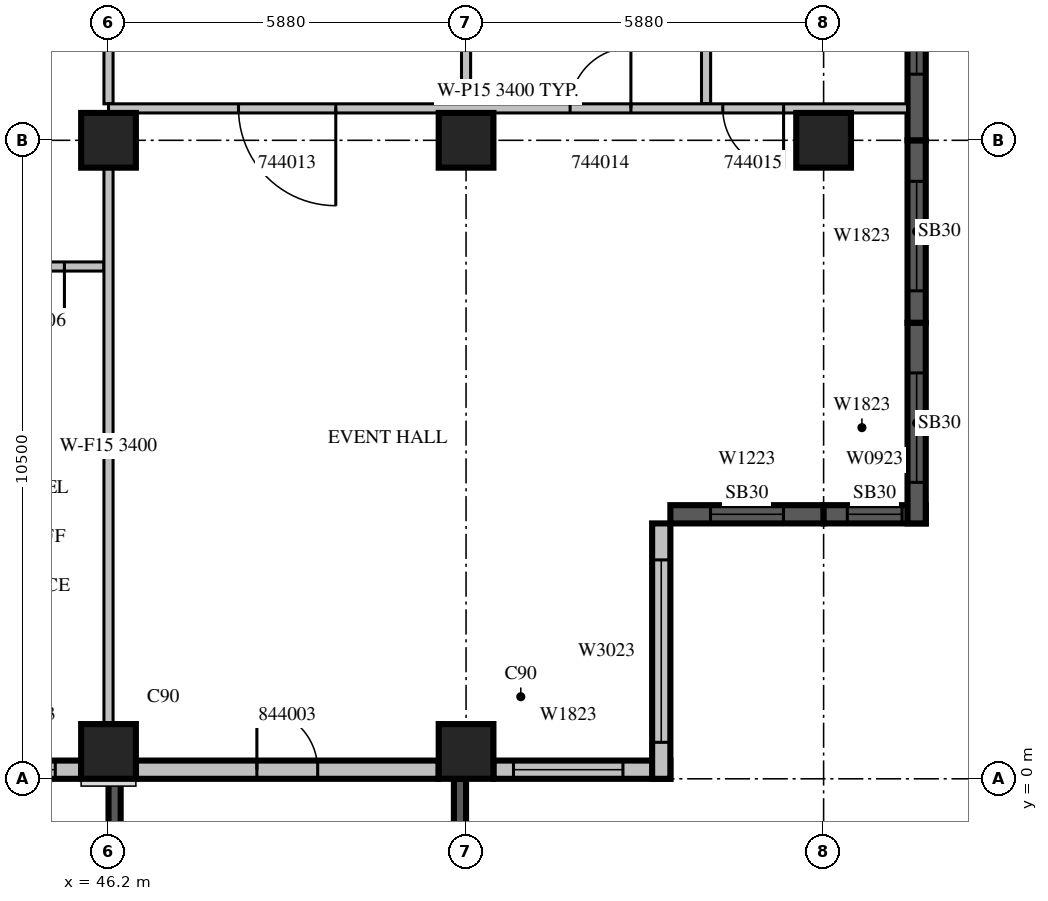
"""IFC4 building model, lengths in metres.
Left out: names, types, materials, properties, quantities, classifications, styles, units other than length and angle.
Written with IfcOpenShell. Run it as: python <this file> out.ifc"""

import sys

from ifc_helpers import new_model, si_unit, direction, frame, frame_2d, origin, origin_2d, place, context, subcontext, project, spatial, rectangle, extrude, source, transform, mapped, element, fill, save


model = new_model("IFC4")
c1 = context("Model", 3, precision=1e-05, world=origin(), true_north=direction((0.0, 1.0)))
c2 = subcontext(c1, "Body", "Model", "MODEL_VIEW")
j1 = project(units=[si_unit("LENGTHUNIT", "METRE"), si_unit("PLANEANGLEUNIT", "RADIAN")], contexts=[c1])
p1 = place(None, origin())
s1 = spatial("IfcSite", under=j1, at=p1, CompositionType="ELEMENT")
p2 = place(p1, origin())
s2 = spatial("IfcBuilding", under=s1, at=p2, CompositionType="ELEMENT")
p3 = place(p2, frame((0.0, 0.0, 200.6)))
s3 = spatial("IfcBuildingStorey", under=s2, at=p3, CompositionType="ELEMENT", Elevation=200.6)
m1 = source(origin(), c2, "Body", "SweptSolid", [
    extrude(rectangle(XDim=0.9, YDim=0.9, at=origin_2d()), origin(), (0.0, 0.0, 1.0), 3.8),
])
for number, where, z_axis, x_axis in (
    (1, (46.2, 0.45, 0.0), (0.0, 0.0, 1.0), (1.0, 0.0, 0.0)),
    (2, (52.08, 0.45, 0.0), (0.0, 0.0, 1.0), (1.0, 0.0, 0.0)),
    (3, (46.2, 10.5, 0.0), (0.0, 0.0, 1.0), (1.0, 0.0, 0.0)),
    (4, (52.08, 10.5, 0.0), (0.0, 0.0, 1.0), (1.0, 0.0, 0.0)),
    (5, (57.96, 10.5, 0.0), (0.0, 0.0, 1.0), (1.0, 0.0, 0.0)),
):
    element("IfcColumn", number, at=place(p3, frame(where, z_axis=z_axis, x_axis=x_axis)), inside=s3, PredefinedType="COLUMN", context=c2, shape_type="MappedRepresentation", body=[
        mapped(m1, transform((0.0, 0.0, 0.0), scale=1.0)),
    ])
m2 = source(origin(), c2, "Body", "SweptSolid", [
    extrude(rectangle(XDim=1.75, YDim=0.3, at=frame_2d((0.875, 0.0))), origin(), (0.0, 0.0, 1.0), 3.4),
])
p4 = place(p3, frame((44.0, 0.15, 0.0), z_axis=(0.0, 0.0, 1.0), x_axis=(1.0, 0.0, 0.0)))
e6 = element("IfcWall", 6, at=p4, inside=s3, PredefinedType="STANDARD", context=c2, shape_type="MappedRepresentation", body=[
    mapped(m2, transform((0.0, 0.0, 0.0), scale=1.0)),
])
m3 = source(origin(), c2, "Body", "SweptSolid", [
    extrude(rectangle(XDim=0.9, YDim=2.3, at=frame_2d((0.45, 1.15))), frame((0.0, 0.16, 0.0), z_axis=(0.0, -1.0, 0.0), x_axis=(1.0, 0.0, 0.0)), (0.0, 0.0, 1.0), 0.32),
])
p5 = place(p4, frame((0.425, 0.0, 0.6)))
e7 = element("IfcOpeningElement", 7, at=p5, cuts=e6, PredefinedType="OPENING", context=c2, shape_type="MappedRepresentation", body=[
    mapped(m3, transform((0.0, 0.0, 0.0), scale=1.0)),
])
m4 = source(origin(), c2, "Body", "SweptSolid", [
    extrude(rectangle(XDim=4.98, YDim=0.3, at=frame_2d((2.49, 0.0))), origin(), (0.0, 0.0, 1.0), 3.4),
])
p6 = place(p3, frame((46.65, 0.15, 0.0), z_axis=(0.0, 0.0, 1.0), x_axis=(1.0, 0.0, 0.0)))
e8 = element("IfcWall", 8, at=p6, inside=s3, PredefinedType="STANDARD", context=c2, shape_type="MappedRepresentation", body=[
    mapped(m4, transform((0.0, 0.0, 0.0), scale=1.0)),
])
m5 = source(origin(), c2, "Body", "SweptSolid", [
    extrude(rectangle(XDim=1.0, YDim=2.1, at=frame_2d((0.5, 1.05))), frame((0.0, 0.16, 0.0), z_axis=(0.0, -1.0, 0.0), x_axis=(1.0, 0.0, 0.0)), (0.0, 0.0, 1.0), 0.32),
])
p7 = place(p6, frame((1.99, 0.0, 0.0)))
e9 = element("IfcOpeningElement", 9, at=p7, cuts=e8, PredefinedType="OPENING", context=c2, shape_type="MappedRepresentation", body=[
    mapped(m5, transform((0.0, 0.0, 0.0), scale=1.0)),
])
m6 = source(origin(), c2, "Body", "SweptSolid", [
    extrude(rectangle(XDim=2.91, YDim=0.3, at=frame_2d((1.455, 0.0))), origin(), (0.0, 0.0, 1.0), 3.4),
])
p8 = place(p3, frame((52.53, 0.15, 0.0), z_axis=(0.0, 0.0, 1.0), x_axis=(1.0, 0.0, 0.0)))
e10 = element("IfcWall", 10, at=p8, inside=s3, PredefinedType="STANDARD", context=c2, shape_type="MappedRepresentation", body=[
    mapped(m6, transform((0.0, 0.0, 0.0), scale=1.0)),
])
m7 = source(origin(), c2, "Body", "SweptSolid", [
    extrude(rectangle(XDim=1.8, YDim=2.3, at=frame_2d((0.9, 1.15))), frame((0.0, 0.16, 0.0), z_axis=(0.0, -1.0, 0.0), x_axis=(1.0, 0.0, 0.0)), (0.0, 0.0, 1.0), 0.32),
])
p9 = place(p8, frame((0.33, 0.0, 0.6)))
e11 = element("IfcOpeningElement", 11, at=p9, cuts=e10, PredefinedType="OPENING", context=c2, shape_type="MappedRepresentation", body=[
    mapped(m7, transform((0.0, 0.0, 0.0), scale=1.0)),
])
m8 = source(origin(), c2, "Body", "SweptSolid", [
    extrude(rectangle(XDim=4.2, YDim=0.3, at=frame_2d((2.1, 0.0))), origin(), (0.0, 0.0, 1.0), 3.4),
])
p10 = place(p3, frame((55.29, 0.0, 0.0), z_axis=(0.0, 0.0, 1.0), x_axis=(0.0, 1.0, 0.0)))
e12 = element("IfcWall", 12, at=p10, inside=s3, PredefinedType="STANDARD", context=c2, shape_type="MappedRepresentation", body=[
    mapped(m8, transform((0.0, 0.0, 0.0), scale=1.0)),
])
m9 = source(origin(), c2, "Body", "SweptSolid", [
    extrude(rectangle(XDim=3.0, YDim=2.3, at=frame_2d((1.5, 1.15))), frame((0.0, 0.16, 0.0), z_axis=(0.0, -1.0, 0.0), x_axis=(1.0, 0.0, 0.0)), (0.0, 0.0, 1.0), 0.32),
])
p11 = place(p10, frame((0.6, 0.0, 0.6)))
e13 = element("IfcOpeningElement", 13, at=p11, cuts=e12, PredefinedType="OPENING", context=c2, shape_type="MappedRepresentation", body=[
    mapped(m9, transform((0.0, 0.0, 0.0), scale=1.0)),
])
p12 = place(p3, frame((55.44, 4.35, 0.0), z_axis=(0.0, 0.0, 1.0), x_axis=(1.0, 0.0, 0.0)))
e14 = element("IfcWall", 14, at=p12, inside=s3, PredefinedType="SOLIDWALL", context=c2, shape_type="SweptSolid", body=[
    extrude(rectangle(XDim=2.52, YDim=0.3, at=frame_2d((1.26, 0.0))), origin(), (0.0, 0.0, 1.0), 3.4),
])
m10 = source(origin(), c2, "Body", "SweptSolid", [
    extrude(rectangle(XDim=1.2, YDim=2.3, at=frame_2d((0.6, 1.15))), frame((0.0, 0.16, 0.0), z_axis=(0.0, -1.0, 0.0), x_axis=(1.0, 0.0, 0.0)), (0.0, 0.0, 1.0), 0.32),
])
p13 = place(p12, frame((0.66, 0.0, 0.6)))
e15 = element("IfcOpeningElement", 15, at=p13, cuts=e14, PredefinedType="OPENING", context=c2, shape_type="MappedRepresentation", body=[
    mapped(m10, transform((0.0, 0.0, 0.0), scale=1.0)),
])
p14 = place(p3, frame((57.96, 4.35, 0.0), z_axis=(0.0, 0.0, 1.0), x_axis=(1.0, 0.0, 0.0)))
e16 = element("IfcWall", 16, at=p14, inside=s3, PredefinedType="SOLIDWALL", context=c2, shape_type="SweptSolid", body=[
    extrude(rectangle(XDim=1.68, YDim=0.3, at=frame_2d((0.84, 0.0))), origin(), (0.0, 0.0, 1.0), 3.4),
])
p15 = place(p14, frame((0.39, 0.0, 0.6)))
e17 = element("IfcOpeningElement", 17, at=p15, cuts=e16, PredefinedType="OPENING", context=c2, shape_type="MappedRepresentation", body=[
    mapped(m3, transform((0.0, 0.0, 0.0), scale=1.0)),
])
p16 = place(p3, frame((59.49, 4.2, 0.0), z_axis=(0.0, 0.0, 1.0), x_axis=(0.0, 1.0, 0.0)))
e18 = element("IfcWall", 18, at=p16, inside=s3, PredefinedType="SOLIDWALL", context=c2, shape_type="SweptSolid", body=[
    extrude(rectangle(XDim=3.3, YDim=0.3, at=frame_2d((1.65, 0.0))), origin(), (0.0, 0.0, 1.0), 3.4),
])
p17 = place(p16, frame((0.675, 0.0, 0.6)))
e19 = element("IfcOpeningElement", 19, at=p17, cuts=e18, PredefinedType="OPENING", context=c2, shape_type="MappedRepresentation", body=[
    mapped(m7, transform((0.0, 0.0, 0.0), scale=1.0)),
])
p18 = place(p3, frame((59.49, 7.5, 0.0), z_axis=(0.0, 0.0, 1.0), x_axis=(0.0, 1.0, 0.0)))
e20 = element("IfcWall", 20, at=p18, inside=s3, PredefinedType="SOLIDWALL", context=c2, shape_type="SweptSolid", body=[
    extrude(rectangle(XDim=3.0, YDim=0.3, at=frame_2d((1.5, 0.0))), origin(), (0.0, 0.0, 1.0), 3.4),
])
p19 = place(p18, frame((0.525, 0.0, 0.6)))
e21 = element("IfcOpeningElement", 21, at=p19, cuts=e20, PredefinedType="OPENING", context=c2, shape_type="MappedRepresentation", body=[
    mapped(m7, transform((0.0, 0.0, 0.0), scale=1.0)),
])
p20 = place(p3, frame((59.49, 10.5, 0.0), z_axis=(0.0, 0.0, 1.0), x_axis=(0.0, 1.0, 0.0)))
e22 = element("IfcWall", 22, at=p20, inside=s3, PredefinedType="SOLIDWALL", context=c2, shape_type="SweptSolid", body=[
    extrude(rectangle(XDim=3.375, YDim=0.3, at=frame_2d((1.688, 0.0))), origin(), (0.0, 0.0, 1.0), 3.4),
])
p21 = place(p20, frame((1.087, 0.0, 0.6)))
e23 = element("IfcOpeningElement", 23, at=p21, cuts=e22, PredefinedType="OPENING", context=c2, shape_type="MappedRepresentation", body=[
    mapped(m10, transform((0.0, 0.0, 0.0), scale=1.0)),
])
m11 = source(origin(), c2, "Body", "SweptSolid", [
    extrude(rectangle(XDim=3.9, YDim=0.2, at=frame_2d((1.95, 0.0))), origin(), (0.0, 0.0, 1.0), 3.39),
])
p22 = place(p3, frame((46.3, 0.0, 0.0), z_axis=(0.0, 0.0, 1.0), x_axis=(0.0, -1.0, 0.0)))
e24 = element("IfcWall", 24, at=p22, inside=s3, PredefinedType="SOLIDWALL", context=c2, shape_type="MappedRepresentation", body=[
    mapped(m11, transform((0.0, 0.0, 0.0), scale=1.0)),
])
m12 = source(origin(), c2, "Body", "SweptSolid", [
    extrude(rectangle(XDim=2.4, YDim=2.3, at=frame_2d((1.2, 1.15))), frame((0.0, 0.11, 0.0), z_axis=(0.0, -1.0, 0.0), x_axis=(1.0, 0.0, 0.0)), (0.0, 0.0, 1.0), 0.22),
])
p23 = place(p22, frame((0.75, 0.0, 0.6)))
e25 = element("IfcOpeningElement", 25, at=p23, cuts=e24, PredefinedType="OPENING", context=c2, shape_type="MappedRepresentation", body=[
    mapped(m12, transform((0.0, 0.0, 0.0), scale=1.0)),
])
p24 = place(p3, frame((51.98, 0.0, 0.0), z_axis=(0.0, 0.0, 1.0), x_axis=(0.0, -1.0, 0.0)))
e26 = element("IfcWall", 26, at=p24, inside=s3, PredefinedType="SOLIDWALL", context=c2, shape_type="MappedRepresentation", body=[
    mapped(m11, transform((0.0, 0.0, 0.0), scale=1.0)),
])
p25 = place(p24, frame((0.75, 0.0, 0.6)))
e27 = element("IfcOpeningElement", 27, at=p25, cuts=e26, PredefinedType="OPENING", context=c2, shape_type="MappedRepresentation", body=[
    mapped(m12, transform((0.0, 0.0, 0.0), scale=1.0)),
])
m13 = source(origin(), c2, "Body", "SweptSolid", [
    extrude(rectangle(XDim=2.2, YDim=0.15, at=frame_2d((1.1, 0.0))), origin(), (0.0, 0.0, 1.0), 3.4),
])
p26 = place(p3, frame((46.125, 8.425, 0.0), z_axis=(0.0, 0.0, 1.0), x_axis=(-1.0, 0.0, 0.0)))
e28 = element("IfcWall", 28, at=p26, inside=s3, PredefinedType="PARTITIONING", context=c2, shape_type="MappedRepresentation", body=[
    mapped(m13, transform((0.0, 0.0, 0.0), scale=1.0)),
])
m14 = source(origin(), c2, "Body", "SweptSolid", [
    extrude(rectangle(XDim=0.9, YDim=2.1, at=frame_2d((0.45, 1.05))), frame((0.0, 0.085, 0.0), z_axis=(0.0, -1.0, 0.0), x_axis=(1.0, 0.0, 0.0)), (0.0, 0.0, 1.0), 0.17),
])
p27 = place(p26, frame((0.65, 0.0, 0.0)))
e29 = element("IfcOpeningElement", 29, at=p27, cuts=e28, PredefinedType="OPENING", context=c2, shape_type="MappedRepresentation", body=[
    mapped(m14, transform((0.0, 0.0, 0.0), scale=1.0)),
])
m15 = source(origin(), c2, "Body", "SweptSolid", [
    extrude(rectangle(XDim=3.9, YDim=0.15, at=frame_2d((1.95, 0.0))), origin(), (0.0, 0.0, 1.0), 3.4),
])
for number, where, z_axis, x_axis in (
    (30, (52.08, 11.1, 0.0), (0.0, 0.0, 1.0), (0.0, 1.0, 0.0)),
    (31, (56.027, 11.1, 0.0), (0.0, 0.0, 1.0), (0.0, 1.0, 0.0)),
):
    element("IfcWall", number, at=place(p3, frame(where, z_axis=z_axis, x_axis=x_axis)), inside=s3, PredefinedType="PARTITIONING", context=c2, shape_type="MappedRepresentation", body=[
        mapped(m15, transform((0.0, 0.0, 0.0), scale=1.0)),
    ])
m16 = source(origin(), c2, "Body", "SweptSolid", [
    extrude(rectangle(XDim=9.152, YDim=0.15, at=frame_2d((4.576, 0.0))), origin(), (0.0, 0.0, 1.0), 3.4),
])
p28 = place(p3, frame((46.2, 0.899, 0.0), z_axis=(0.0, 0.0, 1.0), x_axis=(0.0, 1.0, 0.0)))
e32 = element("IfcWall", 32, at=p28, inside=s3, PredefinedType="PARTITIONING", context=c2, shape_type="MappedRepresentation", body=[
    mapped(m16, transform((0.0, 0.0, 0.0), scale=1.0)),
])
p29 = place(p3, frame((46.2, 11.1, 0.0), z_axis=(0.0, 0.0, 1.0), x_axis=(0.0, 1.0, 0.0)))
e33 = element("IfcWall", 33, at=p29, inside=s3, PredefinedType="PARTITIONING", context=c2, shape_type="MappedRepresentation", body=[
    mapped(m15, transform((0.0, 0.0, 0.0), scale=1.0)),
])
m17 = source(origin(), c2, "Body", "SweptSolid", [
    extrude(rectangle(XDim=13.14, YDim=0.15, at=frame_2d((6.57, 0.0))), origin(), (0.0, 0.0, 1.0), 3.4),
])
p30 = place(p3, frame((59.34, 11.025, 0.0), z_axis=(0.0, 0.0, 1.0), x_axis=(-1.0, 0.0, 0.0)))
e34 = element("IfcWall", 34, at=p30, inside=s3, PredefinedType="PARTITIONING", context=c2, shape_type="MappedRepresentation", body=[
    mapped(m17, transform((0.0, 0.0, 0.0), scale=1.0)),
])
m18 = source(origin(), c2, "Body", "SweptSolid", [
    extrude(rectangle(XDim=1.6, YDim=2.1, at=frame_2d((0.8, 1.05))), frame((0.0, 0.085, 0.0), z_axis=(0.0, -1.0, 0.0), x_axis=(1.0, 0.0, 0.0)), (0.0, 0.0, 1.0), 0.17),
])
p31 = place(p30, frame((9.402, 0.0, 0.0)))
e35 = element("IfcOpeningElement", 35, at=p31, cuts=e34, PredefinedType="OPENING", context=c2, shape_type="MappedRepresentation", body=[
    mapped(m18, transform((0.0, 0.0, 0.0), scale=1.0)),
])
m19 = source(origin(), c2, "Body", "SweptSolid", [
    extrude(rectangle(XDim=1.0, YDim=2.1, at=frame_2d((0.5, 1.05))), frame((0.0, 0.085, 0.0), z_axis=(0.0, -1.0, 0.0), x_axis=(1.0, 0.0, 0.0)), (0.0, 0.0, 1.0), 0.17),
])
p32 = place(p30, frame((4.549, 0.0, 0.0)))
e36 = element("IfcOpeningElement", 36, at=p32, cuts=e34, PredefinedType="OPENING", context=c2, shape_type="MappedRepresentation", body=[
    mapped(m19, transform((0.0, 0.0, 0.0), scale=1.0)),
])
p33 = place(p30, frame((2.038, 0.0, 0.0)))
e37 = element("IfcOpeningElement", 37, at=p33, cuts=e34, PredefinedType="OPENING", context=c2, shape_type="MappedRepresentation", body=[
    mapped(m19, transform((0.0, 0.0, 0.0), scale=1.0)),
])
m20 = source(origin(), c2, "Body", "SweptSolid", [
    extrude(rectangle(XDim=0.9, YDim=2.3, at=frame_2d((0.45, 1.15))), frame((0.0, 0.03, 0.0), z_axis=(0.0, -1.0, 0.0), x_axis=(1.0, 0.0, 0.0)), (0.0, 0.0, 1.0), 0.06),
])
p34 = place(p5, origin())
e38 = element("IfcWindow", 38, at=p34, inside=s3, PartitioningType="SINGLE_PANEL", PredefinedType="WINDOW", context=c2, shape_type="MappedRepresentation", body=[
    mapped(m20, transform((0.0, 0.0, 0.0), scale=1.0)),
])
fill(e7, e38)
m21 = source(origin(), c2, "Body", "SweptSolid", [
    extrude(rectangle(XDim=1.8, YDim=2.3, at=frame_2d((0.9, 1.15))), frame((0.0, 0.03, 0.0), z_axis=(0.0, -1.0, 0.0), x_axis=(1.0, 0.0, 0.0)), (0.0, 0.0, 1.0), 0.06),
])
p35 = place(p9, origin())
e39 = element("IfcWindow", 39, at=p35, inside=s3, PartitioningType="SINGLE_PANEL", PredefinedType="WINDOW", context=c2, shape_type="MappedRepresentation", body=[
    mapped(m21, transform((0.0, 0.0, 0.0), scale=1.0)),
])
fill(e11, e39)
m22 = source(origin(), c2, "Body", "SweptSolid", [
    extrude(rectangle(XDim=3.0, YDim=2.3, at=frame_2d((1.5, 1.15))), frame((0.0, 0.03, 0.0), z_axis=(0.0, -1.0, 0.0), x_axis=(1.0, 0.0, 0.0)), (0.0, 0.0, 1.0), 0.06),
])
p36 = place(p11, origin())
e40 = element("IfcWindow", 40, at=p36, inside=s3, PartitioningType="SINGLE_PANEL", PredefinedType="WINDOW", context=c2, shape_type="MappedRepresentation", body=[
    mapped(m22, transform((0.0, 0.0, 0.0), scale=1.0)),
])
fill(e13, e40)
m23 = source(origin(), c2, "Body", "SweptSolid", [
    extrude(rectangle(XDim=1.2, YDim=2.3, at=frame_2d((0.6, 1.15))), frame((0.0, 0.03, 0.0), z_axis=(0.0, -1.0, 0.0), x_axis=(1.0, 0.0, 0.0)), (0.0, 0.0, 1.0), 0.06),
])
p37 = place(p13, origin())
e41 = element("IfcWindow", 41, at=p37, inside=s3, PartitioningType="SINGLE_PANEL", PredefinedType="WINDOW", context=c2, shape_type="MappedRepresentation", body=[
    mapped(m23, transform((0.0, 0.0, 0.0), scale=1.0)),
])
fill(e15, e41)
p38 = place(p15, origin())
e42 = element("IfcWindow", 42, at=p38, inside=s3, PartitioningType="SINGLE_PANEL", PredefinedType="WINDOW", context=c2, shape_type="MappedRepresentation", body=[
    mapped(m20, transform((0.0, 0.0, 0.0), scale=1.0)),
])
fill(e17, e42)
p39 = place(p17, origin())
e43 = element("IfcWindow", 43, at=p39, inside=s3, PartitioningType="SINGLE_PANEL", PredefinedType="WINDOW", context=c2, shape_type="MappedRepresentation", body=[
    mapped(m21, transform((0.0, 0.0, 0.0), scale=1.0)),
])
fill(e19, e43)
p40 = place(p19, origin())
e44 = element("IfcWindow", 44, at=p40, inside=s3, PartitioningType="SINGLE_PANEL", PredefinedType="WINDOW", context=c2, shape_type="MappedRepresentation", body=[
    mapped(m21, transform((0.0, 0.0, 0.0), scale=1.0)),
])
fill(e21, e44)
p41 = place(p21, origin())
e45 = element("IfcWindow", 45, at=p41, inside=s3, PartitioningType="SINGLE_PANEL", PredefinedType="WINDOW", context=c2, shape_type="MappedRepresentation", body=[
    mapped(m23, transform((0.0, 0.0, 0.0), scale=1.0)),
])
fill(e23, e45)
m24 = source(origin(), c2, "Body", "SweptSolid", [
    extrude(rectangle(XDim=0.9, YDim=2.1, at=frame_2d((0.45, 1.05))), frame((0.0, 0.025, 0.0), z_axis=(0.0, -1.0, 0.0), x_axis=(1.0, 0.0, 0.0)), (0.0, 0.0, 1.0), 0.05),
])
p42 = place(p27, origin())
e46 = element("IfcDoor", 46, at=p42, inside=s3, OperationType="SINGLE_SWING_LEFT", PredefinedType="DOOR", context=c2, shape_type="MappedRepresentation", body=[
    mapped(m24, transform((0.0, 0.0, 0.0), scale=1.0)),
])
fill(e29, e46)
m25 = source(origin(), c2, "Body", "SweptSolid", [
    extrude(rectangle(XDim=1.6, YDim=2.1, at=frame_2d((0.8, 1.05))), frame((0.0, 0.025, 0.0), z_axis=(0.0, -1.0, 0.0), x_axis=(1.0, 0.0, 0.0)), (0.0, 0.0, 1.0), 0.05),
])
p43 = place(p31, origin())
e47 = element("IfcDoor", 47, at=p43, inside=s3, OperationType="SINGLE_SWING_LEFT", PredefinedType="DOOR", context=c2, shape_type="MappedRepresentation", body=[
    mapped(m25, transform((0.0, 0.0, 0.0), scale=1.0)),
])
fill(e35, e47)
m26 = source(origin(), c2, "Body", "SweptSolid", [
    extrude(rectangle(XDim=1.0, YDim=2.1, at=frame_2d((0.5, 1.05))), frame((0.0, 0.025, 0.0), z_axis=(0.0, -1.0, 0.0), x_axis=(1.0, 0.0, 0.0)), (0.0, 0.0, 1.0), 0.05),
])
p44 = place(p32, origin())
e48 = element("IfcDoor", 48, at=p44, inside=s3, OperationType="SINGLE_SWING_RIGHT", PredefinedType="DOOR", context=c2, shape_type="MappedRepresentation", body=[
    mapped(m26, transform((0.0, 0.0, 0.0), scale=1.0)),
])
fill(e36, e48)
p45 = place(p33, origin())
e49 = element("IfcDoor", 49, at=p45, inside=s3, OperationType="SINGLE_SWING_LEFT", PredefinedType="DOOR", context=c2, shape_type="MappedRepresentation", body=[
    mapped(m26, transform((0.0, 0.0, 0.0), scale=1.0)),
])
fill(e37, e49)
p46 = place(p7, origin())
e50 = element("IfcDoor", 50, at=p46, inside=s3, OperationType="SINGLE_SWING_LEFT", PredefinedType="DOOR", context=c2, shape_type="MappedRepresentation", body=[
    mapped(m26, transform((0.0, 0.0, 0.0), scale=1.0)),
])
fill(e9, e50)
save(model, sys.argv[1])
